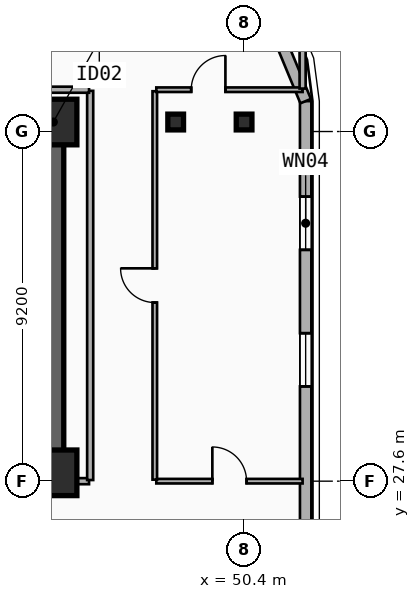
"""IFC4 building model, lengths in metres.
Left out: names, types, materials, properties, quantities, classifications, styles, units other than length and angle.
Written with IfcOpenShell. Run it as: python <this file> out.ifc"""

import sys

from ifc_helpers import new_model, si_unit, direction, frame, frame_2d, origin, origin_2d, place, context, subcontext, project, spatial, rectangle, i_section, extrude, element, fill, save


model = new_model("IFC4")
c1 = context("Model", 3, precision=1e-05, world=origin(), true_north=direction((0.0, 1.0)))
c2 = subcontext(c1, "Body", "Model", "MODEL_VIEW")
j1 = project(units=[si_unit("LENGTHUNIT", "METRE"), si_unit("PLANEANGLEUNIT", "RADIAN")], contexts=[c1])
p1 = place(None, origin())
s1 = spatial("IfcSite", under=j1, at=p1, CompositionType="ELEMENT")
p2 = place(p1, origin())
s2 = spatial("IfcBuilding", under=s1, at=p2, CompositionType="ELEMENT")
p3 = place(p2, frame((0.0, 0.0, 169.65)))
s3 = spatial("IfcBuildingStorey", under=s2, at=p3, CompositionType="ELEMENT", Elevation=169.65)
p4 = place(p3, frame((12.15, 37.05, 0.0), z_axis=(0.0, 0.0, 1.0), x_axis=(1.0, 0.0, 0.0)))
e1 = element("IfcWall", 1, at=p4, inside=s3, PredefinedType="SHEAR", context=c2, shape_type="SweptSolid", body=[
    extrude(rectangle(XDim=33.23, YDim=0.55, at=frame_2d((16.615, 0.0))), origin(), (0.0, 0.0, 1.0), 3.55),
])
p5 = place(p3, frame((45.38, 27.82, 0.0), z_axis=(0.0, 0.0, 1.0), x_axis=(-1.0, 0.0, 0.0)))
e2 = element("IfcWall", 2, at=p5, inside=s3, PredefinedType="SHEAR", context=c2, shape_type="SweptSolid", body=[
    extrude(rectangle(XDim=12.23, YDim=0.55, at=frame_2d((6.115, 0.0))), origin(), (0.0, 0.0, 1.0), 3.55),
])
p6 = place(p5, frame((9.93, 0.0, 0.0)))
e3 = element("IfcOpeningElement", 3, at=p6, cuts=e2, PredefinedType="OPENING", context=c2, shape_type="SweptSolid", body=[
    extrude(rectangle(XDim=1.1, YDim=2.15, at=frame_2d((0.55, 1.075))), frame((0.0, 0.285, 0.0), z_axis=(0.0, -1.0, 0.0), x_axis=(1.0, 0.0, 0.0)), (0.0, 0.0, 1.0), 0.57),
])
p7 = place(p5, frame((6.23, 0.0, 0.0)))
e4 = element("IfcOpeningElement", 4, at=p7, cuts=e2, PredefinedType="OPENING", context=c2, shape_type="SweptSolid", body=[
    extrude(rectangle(XDim=1.1, YDim=2.15, at=frame_2d((0.55, 1.075))), frame((0.0, 0.285, 0.0), z_axis=(0.0, -1.0, 0.0), x_axis=(1.0, 0.0, 0.0)), (0.0, 0.0, 1.0), 0.57),
])
p8 = place(p3, frame((45.38, 28.095, 0.0), z_axis=(0.0, 0.0, 1.0), x_axis=(0.0, 1.0, 0.0)))
e5 = element("IfcWall", 5, at=p8, inside=s3, PredefinedType="SHEAR", context=c2, shape_type="SweptSolid", body=[
    extrude(rectangle(XDim=8.68, YDim=0.55, at=frame_2d((4.34, 0.0))), origin(), (0.0, 0.0, 1.0), 3.55),
])
for number, where, z_axis, x_axis in (
    (6, (45.4, 27.82, 0.0), (0.0, 0.0, 1.0), (1.0, 0.0, 0.0)),
    (7, (45.4, 37.05, 0.0), (0.0, 0.0, 1.0), (1.0, 0.0, 0.0)),
):
    element("IfcColumn", number, at=place(p3, frame(where, z_axis=z_axis, x_axis=x_axis)), inside=s3, PredefinedType="COLUMN", context=c2, shape_type="SweptSolid", body=[
        extrude(rectangle(XDim=1.2, YDim=1.2, at=origin_2d()), origin(), (0.0, 0.0, 1.0), 3.55),
    ])
for number, where, z_axis, x_axis in (
    (8, (48.6, 37.05, 0.0), (0.0, 0.0, 1.0), (1.0, 0.0, 0.0)),
    (9, (50.4, 37.05, 0.0), (0.0, 0.0, 1.0), (1.0, 0.0, 0.0)),
):
    element("IfcColumn", number, at=place(p3, frame(where, z_axis=z_axis, x_axis=x_axis)), inside=s3, PredefinedType="COLUMN", context=c2, shape_type="SweptSolid", body=[
        extrude(i_section(OverallWidth=0.413, OverallDepth=0.415, WebThickness=0.03, FlangeThickness=0.047, FilletRadius=0.015, at=origin_2d()), origin(), (0.0, 0.0, 1.0), 3.55),
    ])
p9 = place(p3, frame((52.02, 37.6, 0.0), z_axis=(0.0, 0.0, 1.0), x_axis=(0.0, -1.0, 0.0)))
e10 = element("IfcWall", 10, at=p9, inside=s3, PredefinedType="SOLIDWALL", context=c2, shape_type="SweptSolid", body=[
    extrude(rectangle(XDim=23.0, YDim=0.3, at=frame_2d((11.5, 0.0))), origin(), (0.0, 0.0, 1.0), 3.29),
])
p10 = place(p9, frame((2.513, 0.0, 0.34)))
e11 = element("IfcOpeningElement", 11, at=p10, cuts=e10, PredefinedType="OPENING", context=c2, shape_type="SweptSolid", body=[
    extrude(rectangle(XDim=1.4, YDim=2.1, at=frame_2d((0.7, 1.05))), frame((0.0, 0.16, 0.0), z_axis=(0.0, -1.0, 0.0), x_axis=(1.0, 0.0, 0.0)), (0.0, 0.0, 1.0), 0.32),
])
p11 = place(p9, frame((6.107, 0.0, 0.34)))
e12 = element("IfcOpeningElement", 12, at=p11, cuts=e10, PredefinedType="OPENING", context=c2, shape_type="SweptSolid", body=[
    extrude(rectangle(XDim=1.4, YDim=2.1, at=frame_2d((0.7, 1.05))), frame((0.0, 0.16, 0.0), z_axis=(0.0, -1.0, 0.0), x_axis=(1.0, 0.0, 0.0)), (0.0, 0.0, 1.0), 0.32),
])
p12 = place(p9, frame((14.86, 0.0, 0.34)))
e13 = element("IfcOpeningElement", 13, at=p12, cuts=e10, PredefinedType="OPENING", context=c2, shape_type="SweptSolid", body=[
    extrude(rectangle(XDim=1.4, YDim=2.1, at=frame_2d((0.7, 1.05))), frame((0.0, 0.16, 0.0), z_axis=(0.0, -1.0, 0.0), x_axis=(1.0, 0.0, 0.0)), (0.0, 0.0, 1.0), 0.32),
])
p13 = place(p9, frame((18.77, 0.0, 0.34)))
e14 = element("IfcOpeningElement", 14, at=p13, cuts=e10, PredefinedType="OPENING", context=c2, shape_type="SweptSolid", body=[
    extrude(rectangle(XDim=1.4, YDim=2.1, at=frame_2d((0.7, 1.05))), frame((0.0, 0.16, 0.0), z_axis=(0.0, -1.0, 0.0), x_axis=(1.0, 0.0, 0.0)), (0.0, 0.0, 1.0), 0.32),
])
p14 = place(p3, frame((50.843, 40.443, 0.0), z_axis=(0.0, 0.0, 1.0), x_axis=(0.382704529509, -0.923870793506, 0.0)))
e15 = element("IfcWall", 15, at=p14, inside=s3, PredefinedType="SOLIDWALL", context=c2, shape_type="SweptSolid", body=[
    extrude(rectangle(XDim=3.077, YDim=0.3, at=frame_2d((1.538, 0.0))), origin(), (0.0, 0.0, 1.0), 3.29),
])
p15 = place(p3, frame((48.09, 27.6, 0.0), z_axis=(0.0, 0.0, 1.0), x_axis=(1.0, 0.0, 0.0)))
e16 = element("IfcWall", 16, at=p15, inside=s3, PredefinedType="PARTITIONING", context=c2, shape_type="SweptSolid", body=[
    extrude(rectangle(XDim=3.85, YDim=0.12, at=frame_2d((1.925, 0.0))), origin(), (0.0, 0.0, 1.0), 2.62),
])
p16 = place(p15, frame((1.475, 0.0, 0.0)))
e17 = element("IfcOpeningElement", 17, at=p16, cuts=e16, PredefinedType="OPENING", context=c2, shape_type="SweptSolid", body=[
    extrude(rectangle(XDim=0.9, YDim=2.1, at=frame_2d((0.45, 1.05))), frame((0.0, 0.07, 0.0), z_axis=(0.0, -1.0, 0.0), x_axis=(1.0, 0.0, 0.0)), (0.0, 0.0, 1.0), 0.14),
])
p17 = place(p3, frame((48.05, 27.64, 0.0), z_axis=(0.0, 0.0, 1.0), x_axis=(0.0, 1.0, 0.0)))
e18 = element("IfcWall", 18, at=p17, inside=s3, PredefinedType="PARTITIONING", context=c2, shape_type="SweptSolid", body=[
    extrude(rectangle(XDim=10.22, YDim=0.12, at=frame_2d((5.11, 0.0))), origin(), (0.0, 0.0, 1.0), 2.77),
])
p18 = place(p17, frame((4.66, 0.0, 0.0)))
e19 = element("IfcOpeningElement", 19, at=p18, cuts=e18, PredefinedType="OPENING", context=c2, shape_type="SweptSolid", body=[
    extrude(rectangle(XDim=0.9, YDim=2.1, at=frame_2d((0.45, 1.05))), frame((0.0, 0.07, 0.0), z_axis=(0.0, -1.0, 0.0), x_axis=(1.0, 0.0, 0.0)), (0.0, 0.0, 1.0), 0.14),
])
p19 = place(p3, frame((48.09, 37.9, 0.0), z_axis=(0.0, 0.0, 1.0), x_axis=(1.0, 0.0, 0.0)))
e20 = element("IfcWall", 20, at=p19, inside=s3, PredefinedType="PARTITIONING", context=c2, shape_type="SweptSolid", body=[
    extrude(rectangle(XDim=3.85, YDim=0.12, at=frame_2d((1.925, 0.0))), origin(), (0.0, 0.0, 1.0), 3.29),
])
p20 = place(p19, frame((0.919, 0.0, 0.0)))
e21 = element("IfcOpeningElement", 21, at=p20, cuts=e20, PredefinedType="OPENING", context=c2, shape_type="SweptSolid", body=[
    extrude(rectangle(XDim=0.9, YDim=2.1, at=frame_2d((0.45, 1.05))), frame((0.0, 0.07, 0.0), z_axis=(0.0, -1.0, 0.0), x_axis=(1.0, 0.0, 0.0)), (0.0, 0.0, 1.0), 0.14),
])
p21 = place(p3, frame((45.41, 27.6, 0.0), z_axis=(0.0, 0.0, 1.0), x_axis=(1.0, 0.0, 0.0)))
e22 = element("IfcWall", 22, at=p21, inside=s3, PredefinedType="PARTITIONING", context=c2, shape_type="SweptSolid", body=[
    extrude(rectangle(XDim=0.91, YDim=0.16, at=frame_2d((0.455, 0.0))), origin(), (0.0, 0.0, 1.0), 2.36),
])
p22 = place(p3, frame((46.35, 27.63, 0.0), z_axis=(0.0, 0.0, 1.0), x_axis=(0.0, 1.0, 0.0)))
e23 = element("IfcWall", 23, at=p22, inside=s3, PredefinedType="PARTITIONING", context=c2, shape_type="SweptSolid", body=[
    extrude(rectangle(XDim=10.24, YDim=0.16, at=frame_2d((5.12, 0.0))), origin(), (0.0, 0.0, 1.0), 2.77),
])
p23 = place(p3, frame((11.28, 37.9, 0.0), z_axis=(0.0, 0.0, 1.0), x_axis=(1.0, 0.0, 0.0)))
e24 = element("IfcWall", 24, at=p23, inside=s3, PredefinedType="PARTITIONING", context=c2, shape_type="SweptSolid", body=[
    extrude(rectangle(XDim=35.04, YDim=0.16, at=frame_2d((17.52, 0.0))), origin(), (0.0, 0.0, 1.0), 3.29),
])
p24 = place(p3, frame((51.94, 37.93, 0.0), z_axis=(0.0, 0.0, 1.0), x_axis=(0.0, 1.0, 0.0)))
e25 = element("IfcWall", 25, at=p24, inside=s3, PredefinedType="PARTITIONING", context=c2, shape_type="SweptSolid", body=[
    extrude(rectangle(XDim=1.44, YDim=0.16, at=frame_2d((0.72, 0.0))), origin(), (0.0, 0.0, 1.0), 3.29),
])
p25 = place(p10, origin())
e26 = element("IfcWindow", 26, at=p25, inside=s3, PartitioningType="SINGLE_PANEL", PredefinedType="WINDOW", context=c2, shape_type="SweptSolid", body=[
    extrude(rectangle(XDim=1.4, YDim=2.1, at=frame_2d((0.7, 1.05))), frame((0.0, 0.03, 0.0), z_axis=(0.0, -1.0, 0.0), x_axis=(1.0, 0.0, 0.0)), (0.0, 0.0, 1.0), 0.06),
])
fill(e11, e26)
p26 = place(p11, origin())
e27 = element("IfcWindow", 27, at=p26, inside=s3, PartitioningType="SINGLE_PANEL", PredefinedType="WINDOW", context=c2, shape_type="SweptSolid", body=[
    extrude(rectangle(XDim=1.4, YDim=2.1, at=frame_2d((0.7, 1.05))), frame((0.0, 0.03, 0.0), z_axis=(0.0, -1.0, 0.0), x_axis=(1.0, 0.0, 0.0)), (0.0, 0.0, 1.0), 0.06),
])
fill(e12, e27)
p27 = place(p16, origin())
e28 = element("IfcDoor", 28, at=p27, inside=s3, OperationType="SINGLE_SWING_LEFT", PredefinedType="DOOR", context=c2, shape_type="SweptSolid", body=[
    extrude(rectangle(XDim=0.9, YDim=2.1, at=frame_2d((0.45, 1.05))), frame((0.0, 0.025, 0.0), z_axis=(0.0, -1.0, 0.0), x_axis=(1.0, 0.0, 0.0)), (0.0, 0.0, 1.0), 0.05),
])
fill(e17, e28)
p28 = place(p18, origin())
e29 = element("IfcDoor", 29, at=p28, inside=s3, OperationType="SINGLE_SWING_RIGHT", PredefinedType="DOOR", context=c2, shape_type="SweptSolid", body=[
    extrude(rectangle(XDim=0.9, YDim=2.1, at=frame_2d((0.45, 1.05))), frame((0.0, 0.025, 0.0), z_axis=(0.0, -1.0, 0.0), x_axis=(1.0, 0.0, 0.0)), (0.0, 0.0, 1.0), 0.05),
])
fill(e19, e29)
p29 = place(p20, origin())
e30 = element("IfcDoor", 30, at=p29, inside=s3, OperationType="SINGLE_SWING_RIGHT", PredefinedType="DOOR", context=c2, shape_type="SweptSolid", body=[
    extrude(rectangle(XDim=0.9, YDim=2.1, at=frame_2d((0.45, 1.05))), frame((0.0, 0.025, 0.0), z_axis=(0.0, -1.0, 0.0), x_axis=(1.0, 0.0, 0.0)), (0.0, 0.0, 1.0), 0.05),
])
fill(e21, e30)
save(model, sys.argv[1])
